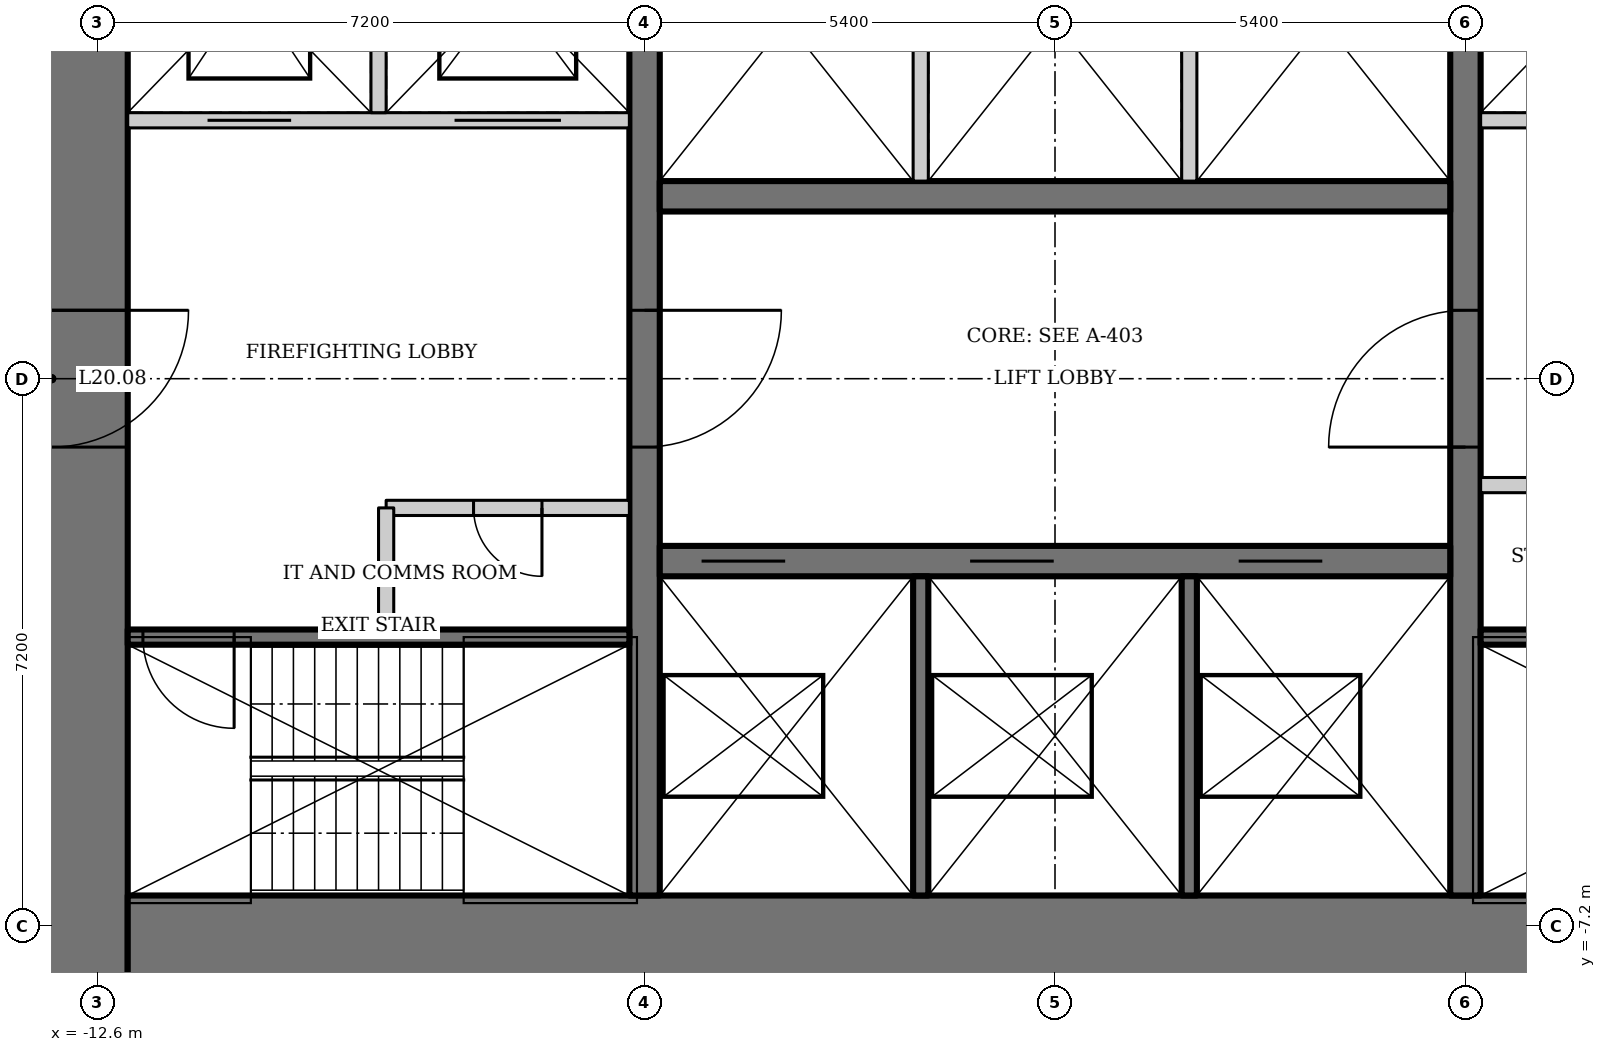
"""IFC4 building model, lengths in metres.
Left out: names, types, materials, properties, quantities, classifications, styles, units other than length and angle.
Written with IfcOpenShell. Run it as: python <this file> out.ifc"""

import sys

from ifc_helpers import new_model, si_unit, direction, frame, frame_2d, origin, place, context, subcontext, project, spatial, rectangle, extrude, element, fill, save


model = new_model("IFC4")
c1 = context("Model", 3, precision=1e-05, world=origin(), true_north=direction((0.0, 1.0)))
c2 = subcontext(c1, "Body", "Model", "MODEL_VIEW")
j1 = project(units=[si_unit("LENGTHUNIT", "METRE"), si_unit("PLANEANGLEUNIT", "RADIAN")], contexts=[c1])
p1 = place(None, origin())
s1 = spatial("IfcSite", under=j1, at=p1, CompositionType="ELEMENT")
p2 = place(p1, origin())
s2 = spatial("IfcBuilding", under=s1, at=p2, CompositionType="ELEMENT")
p3 = place(p2, frame((0.0, 0.0, 87.4)))
s3 = spatial("IfcBuildingStorey", under=s2, at=p3, CompositionType="ELEMENT", Elevation=87.4)
p4 = place(p3, frame((-13.2, 13.0, 0.0), z_axis=(0.0, 0.0, 1.0), x_axis=(0.0, -1.0, 0.0)))
e1 = element("IfcWall", 1, at=p4, inside=s3, PredefinedType="SHEAR", context=c2, shape_type="SweptSolid", body=[
    extrude(rectangle(XDim=26.0, YDim=2.0, at=frame_2d((13.0, 0.0))), origin(), (0.0, 0.0, 1.0), 3.6),
])
p5 = place(p4, frame((12.1, 0.0, 0.0)))
e2 = element("IfcOpeningElement", 2, at=p5, cuts=e1, PredefinedType="OPENING", context=c2, shape_type="SweptSolid", body=[
    extrude(rectangle(XDim=1.8, YDim=2.1, at=frame_2d((0.9, 1.05))), frame((0.0, 1.01, 0.0), z_axis=(0.0, -1.0, 0.0), x_axis=(1.0, 0.0, 0.0)), (0.0, 0.0, 1.0), 2.02),
])
p6 = place(p3, frame((-12.2, -8.0, 0.0), z_axis=(0.0, 0.0, 1.0), x_axis=(1.0, 0.0, 0.0)))
e3 = element("IfcWall", 3, at=p6, inside=s3, PredefinedType="SHEAR", context=c2, shape_type="SweptSolid", body=[
    extrude(rectangle(XDim=24.4, YDim=2.4, at=frame_2d((12.2, 0.0))), origin(), (0.0, 0.0, 1.0), 3.6),
])
p7 = place(p3, frame((5.4, -6.8, 0.0), z_axis=(0.0, 0.0, 1.0), x_axis=(0.0, 1.0, 0.0)))
e4 = element("IfcWall", 4, at=p7, inside=s3, PredefinedType="SHEAR", context=c2, shape_type="SweptSolid", body=[
    extrude(rectangle(XDim=13.6, YDim=0.4, at=frame_2d((6.8, 0.0))), origin(), (0.0, 0.0, 1.0), 3.6),
])
p8 = place(p7, frame((5.9, 0.0, 0.0)))
e5 = element("IfcOpeningElement", 5, at=p8, cuts=e4, PredefinedType="OPENING", context=c2, shape_type="SweptSolid", body=[
    extrude(rectangle(XDim=1.8, YDim=2.1, at=frame_2d((0.9, 1.05))), frame((0.0, 0.21, 0.0), z_axis=(0.0, -1.0, 0.0), x_axis=(1.0, 0.0, 0.0)), (0.0, 0.0, 1.0), 0.42),
])
p9 = place(p3, frame((-5.4, 6.8, 0.0), z_axis=(0.0, 0.0, 1.0), x_axis=(0.0, -1.0, 0.0)))
e6 = element("IfcWall", 6, at=p9, inside=s3, PredefinedType="SHEAR", context=c2, shape_type="SweptSolid", body=[
    extrude(rectangle(XDim=13.6, YDim=0.4, at=frame_2d((6.8, 0.0))), origin(), (0.0, 0.0, 1.0), 3.6),
])
p10 = place(p9, frame((5.9, 0.0, 0.0)))
e7 = element("IfcOpeningElement", 7, at=p10, cuts=e6, PredefinedType="OPENING", context=c2, shape_type="SweptSolid", body=[
    extrude(rectangle(XDim=1.8, YDim=2.1, at=frame_2d((0.9, 1.05))), frame((0.0, 0.21, 0.0), z_axis=(0.0, -1.0, 0.0), x_axis=(1.0, 0.0, 0.0)), (0.0, 0.0, 1.0), 0.42),
])
p11 = place(p3, frame((-5.2, -2.4, 0.0), z_axis=(0.0, 0.0, 1.0), x_axis=(1.0, 0.0, 0.0)))
e8 = element("IfcWall", 8, at=p11, inside=s3, PredefinedType="SHEAR", context=c2, shape_type="SweptSolid", body=[
    extrude(rectangle(XDim=10.4, YDim=0.4, at=frame_2d((5.2, 0.0))), origin(), (0.0, 0.0, 1.0), 3.6),
])
p12 = place(p11, frame((0.55, 0.0, 0.0)))
e9 = element("IfcOpeningElement", 9, at=p12, cuts=e8, PredefinedType="OPENING", context=c2, shape_type="SweptSolid", body=[
    extrude(rectangle(XDim=1.1, YDim=2.2, at=frame_2d((0.55, 1.1))), frame((0.0, 0.21, 0.0), z_axis=(0.0, -1.0, 0.0), x_axis=(1.0, 0.0, 0.0)), (0.0, 0.0, 1.0), 0.42),
])
p13 = place(p11, frame((4.083, 0.0, 0.0)))
e10 = element("IfcOpeningElement", 10, at=p13, cuts=e8, PredefinedType="OPENING", context=c2, shape_type="SweptSolid", body=[
    extrude(rectangle(XDim=1.1, YDim=2.2, at=frame_2d((0.55, 1.1))), frame((0.0, 0.21, 0.0), z_axis=(0.0, -1.0, 0.0), x_axis=(1.0, 0.0, 0.0)), (0.0, 0.0, 1.0), 0.42),
])
p14 = place(p11, frame((7.617, 0.0, 0.0)))
e11 = element("IfcOpeningElement", 11, at=p14, cuts=e8, PredefinedType="OPENING", context=c2, shape_type="SweptSolid", body=[
    extrude(rectangle(XDim=1.1, YDim=2.2, at=frame_2d((0.55, 1.1))), frame((0.0, 0.21, 0.0), z_axis=(0.0, -1.0, 0.0), x_axis=(1.0, 0.0, 0.0)), (0.0, 0.0, 1.0), 0.42),
])
for number, where, z_axis, x_axis in (
    (12, (-1.767, -2.6, 0.0), (0.0, 0.0, 1.0), (0.0, -1.0, 0.0)),
    (13, (1.767, -2.6, 0.0), (0.0, 0.0, 1.0), (0.0, -1.0, 0.0)),
):
    element("IfcWall", number, at=place(p3, frame(where, z_axis=z_axis, x_axis=x_axis)), inside=s3, PredefinedType="SOLIDWALL", context=c2, shape_type="SweptSolid", body=[
        extrude(rectangle(XDim=4.2, YDim=0.2, at=frame_2d((2.1, 0.0))), origin(), (0.0, 0.0, 1.0), 3.6),
    ])
p15 = place(p3, frame((5.2, 2.4, 0.0), z_axis=(0.0, 0.0, 1.0), x_axis=(-1.0, 0.0, 0.0)))
e14 = element("IfcWall", 14, at=p15, inside=s3, PredefinedType="SHEAR", context=c2, shape_type="SweptSolid", body=[
    extrude(rectangle(XDim=10.4, YDim=0.4, at=frame_2d((5.2, 0.0))), origin(), (0.0, 0.0, 1.0), 3.6),
])
for number, where, z_axis, x_axis in (
    (15, (-1.767, 2.6, 0.0), (0.0, 0.0, 1.0), (0.0, 1.0, 0.0)),
    (16, (1.767, 2.6, 0.0), (0.0, 0.0, 1.0), (0.0, 1.0, 0.0)),
):
    element("IfcWall", number, at=place(p3, frame(where, z_axis=z_axis, x_axis=x_axis)), inside=s3, PredefinedType="SOLIDWALL", context=c2, shape_type="SweptSolid", body=[
        extrude(rectangle(XDim=4.2, YDim=0.2, at=frame_2d((2.1, 0.0))), origin(), (0.0, 0.0, 1.0), 3.6),
    ])
p16 = place(p3, frame((5.6, -3.4, 0.0), z_axis=(0.0, 0.0, 1.0), x_axis=(1.0, 0.0, 0.0)))
e17 = element("IfcWall", 17, at=p16, inside=s3, PredefinedType="SHEAR", context=c2, shape_type="SweptSolid", body=[
    extrude(rectangle(XDim=6.6, YDim=0.2, at=frame_2d((3.3, 0.0))), origin(), (0.0, 0.0, 1.0), 3.6),
])
p17 = place(p16, frame((5.2, 0.0, 0.0)))
e18 = element("IfcOpeningElement", 18, at=p17, cuts=e17, PredefinedType="OPENING", context=c2, shape_type="SweptSolid", body=[
    extrude(rectangle(XDim=1.2, YDim=2.1, at=frame_2d((0.6, 1.05))), frame((0.0, 0.11, 0.0), z_axis=(0.0, -1.0, 0.0), x_axis=(1.0, 0.0, 0.0)), (0.0, 0.0, 1.0), 0.22),
])
p18 = place(p3, frame((12.2, 3.4, 0.0), z_axis=(0.0, 0.0, 1.0), x_axis=(-1.0, 0.0, 0.0)))
e19 = element("IfcWall", 19, at=p18, inside=s3, PredefinedType="SOLIDWALL", context=c2, shape_type="SweptSolid", body=[
    extrude(rectangle(XDim=6.6, YDim=0.2, at=frame_2d((3.3, 0.0))), origin(), (0.0, 0.0, 1.0), 3.6),
])
p19 = place(p18, frame((4.45, 0.0, 0.0)))
e20 = element("IfcOpeningElement", 20, at=p19, cuts=e19, PredefinedType="OPENING", context=c2, shape_type="SweptSolid", body=[
    extrude(rectangle(XDim=1.1, YDim=2.2, at=frame_2d((0.55, 1.1))), frame((0.0, 0.11, 0.0), z_axis=(0.0, -1.0, 0.0), x_axis=(1.0, 0.0, 0.0)), (0.0, 0.0, 1.0), 0.22),
])
p20 = place(p18, frame((0.9, 0.0, 0.0)))
e21 = element("IfcOpeningElement", 21, at=p20, cuts=e19, PredefinedType="OPENING", context=c2, shape_type="SweptSolid", body=[
    extrude(rectangle(XDim=1.4, YDim=2.2, at=frame_2d((0.7, 1.1))), frame((0.0, 0.11, 0.0), z_axis=(0.0, -1.0, 0.0), x_axis=(1.0, 0.0, 0.0)), (0.0, 0.0, 1.0), 0.22),
])
p21 = place(p3, frame((-5.6, -3.4, 0.0), z_axis=(0.0, 0.0, 1.0), x_axis=(-1.0, 0.0, 0.0)))
e22 = element("IfcWall", 22, at=p21, inside=s3, PredefinedType="SHEAR", context=c2, shape_type="SweptSolid", body=[
    extrude(rectangle(XDim=6.6, YDim=0.2, at=frame_2d((3.3, 0.0))), origin(), (0.0, 0.0, 1.0), 3.6),
])
p22 = place(p21, frame((5.2, 0.0, 0.0)))
e23 = element("IfcOpeningElement", 23, at=p22, cuts=e22, PredefinedType="OPENING", context=c2, shape_type="SweptSolid", body=[
    extrude(rectangle(XDim=1.2, YDim=2.1, at=frame_2d((0.6, 1.05))), frame((0.0, 0.11, 0.0), z_axis=(0.0, -1.0, 0.0), x_axis=(1.0, 0.0, 0.0)), (0.0, 0.0, 1.0), 0.22),
])
p23 = place(p3, frame((-12.2, 3.4, 0.0), z_axis=(0.0, 0.0, 1.0), x_axis=(1.0, 0.0, 0.0)))
e24 = element("IfcWall", 24, at=p23, inside=s3, PredefinedType="SOLIDWALL", context=c2, shape_type="SweptSolid", body=[
    extrude(rectangle(XDim=6.6, YDim=0.2, at=frame_2d((3.3, 0.0))), origin(), (0.0, 0.0, 1.0), 3.6),
])
p24 = place(p23, frame((1.05, 0.0, 0.0)))
e25 = element("IfcOpeningElement", 25, at=p24, cuts=e24, PredefinedType="OPENING", context=c2, shape_type="SweptSolid", body=[
    extrude(rectangle(XDim=1.1, YDim=2.2, at=frame_2d((0.55, 1.1))), frame((0.0, 0.11, 0.0), z_axis=(0.0, -1.0, 0.0), x_axis=(1.0, 0.0, 0.0)), (0.0, 0.0, 1.0), 0.22),
])
p25 = place(p23, frame((4.3, 0.0, 0.0)))
e26 = element("IfcOpeningElement", 26, at=p25, cuts=e24, PredefinedType="OPENING", context=c2, shape_type="SweptSolid", body=[
    extrude(rectangle(XDim=1.4, YDim=2.2, at=frame_2d((0.7, 1.1))), frame((0.0, 0.11, 0.0), z_axis=(0.0, -1.0, 0.0), x_axis=(1.0, 0.0, 0.0)), (0.0, 0.0, 1.0), 0.22),
])
p26 = place(p3, frame((-8.9, 3.5, 0.0), z_axis=(0.0, 0.0, 1.0), x_axis=(0.0, 1.0, 0.0)))
e27 = element("IfcWall", 27, at=p26, inside=s3, PredefinedType="SOLIDWALL", context=c2, shape_type="SweptSolid", body=[
    extrude(rectangle(XDim=3.3, YDim=0.2, at=frame_2d((1.65, 0.0))), origin(), (0.0, 0.0, 1.0), 3.6),
])
p27 = place(p3, frame((-5.6, -1.7, 0.0), z_axis=(0.0, 0.0, 1.0), x_axis=(-1.0, 0.0, 0.0)))
e28 = element("IfcWall", 28, at=p27, inside=s3, PredefinedType="SOLIDWALL", context=c2, shape_type="SweptSolid", body=[
    extrude(rectangle(XDim=3.2, YDim=0.2, at=frame_2d((1.6, 0.0))), origin(), (0.0, 0.0, 1.0), 3.45),
])
p28 = place(p27, frame((1.15, 0.0, 0.0)))
e29 = element("IfcOpeningElement", 29, at=p28, cuts=e28, PredefinedType="OPENING", context=c2, shape_type="SweptSolid", body=[
    extrude(rectangle(XDim=0.9, YDim=2.1, at=frame_2d((0.45, 1.05))), frame((0.0, 0.11, 0.0), z_axis=(0.0, -1.0, 0.0), x_axis=(1.0, 0.0, 0.0)), (0.0, 0.0, 1.0), 0.22),
])
p29 = place(p3, frame((-8.8, -1.7, 0.0), z_axis=(0.0, 0.0, 1.0), x_axis=(0.0, -1.0, 0.0)))
e30 = element("IfcWall", 30, at=p29, inside=s3, PredefinedType="SOLIDWALL", context=c2, shape_type="SweptSolid", body=[
    extrude(rectangle(XDim=1.6, YDim=0.2, at=frame_2d((0.8, 0.0))), origin(), (0.0, 0.0, 1.0), 3.45),
])
p30 = place(p3, frame((5.6, -1.4, 0.0), z_axis=(0.0, 0.0, 1.0), x_axis=(1.0, 0.0, 0.0)))
e31 = element("IfcWall", 31, at=p30, inside=s3, PredefinedType="SOLIDWALL", context=c2, shape_type="SweptSolid", body=[
    extrude(rectangle(XDim=2.2, YDim=0.2, at=frame_2d((1.1, 0.0))), origin(), (0.0, 0.0, 1.0), 3.45),
])
p31 = place(p30, frame((0.65, 0.0, 0.0)))
e32 = element("IfcOpeningElement", 32, at=p31, cuts=e31, PredefinedType="OPENING", context=c2, shape_type="SweptSolid", body=[
    extrude(rectangle(XDim=0.9, YDim=2.1, at=frame_2d((0.45, 1.05))), frame((0.0, 0.11, 0.0), z_axis=(0.0, -1.0, 0.0), x_axis=(1.0, 0.0, 0.0)), (0.0, 0.0, 1.0), 0.22),
])
p32 = place(p28, origin())
e33 = element("IfcDoor", 33, at=p32, inside=s3, OperationType="SINGLE_SWING_LEFT", PredefinedType="DOOR", context=c2, shape_type="SweptSolid", body=[
    extrude(rectangle(XDim=0.9, YDim=2.1, at=frame_2d((0.45, 1.05))), frame((0.0, 0.025, 0.0), z_axis=(0.0, -1.0, 0.0), x_axis=(1.0, 0.0, 0.0)), (0.0, 0.0, 1.0), 0.05),
])
fill(e29, e33)
p33 = place(p8, origin())
e34 = element("IfcDoor", 34, at=p33, inside=s3, OperationType="DOUBLE_DOOR_DOUBLE_SWING", PredefinedType="DOOR", context=c2, shape_type="SweptSolid", body=[
    extrude(rectangle(XDim=1.8, YDim=2.1, at=frame_2d((0.9, 1.05))), frame((0.0, 0.025, 0.0), z_axis=(0.0, -1.0, 0.0), x_axis=(1.0, 0.0, 0.0)), (0.0, 0.0, 1.0), 0.05),
])
fill(e5, e34)
p34 = place(p10, origin())
e35 = element("IfcDoor", 35, at=p34, inside=s3, OperationType="DOUBLE_DOOR_DOUBLE_SWING", PredefinedType="DOOR", context=c2, shape_type="SweptSolid", body=[
    extrude(rectangle(XDim=1.8, YDim=2.1, at=frame_2d((0.9, 1.05))), frame((0.0, 0.025, 0.0), z_axis=(0.0, -1.0, 0.0), x_axis=(1.0, 0.0, 0.0)), (0.0, 0.0, 1.0), 0.05),
])
fill(e7, e35)
p35 = place(p22, origin())
e36 = element("IfcDoor", 36, at=p35, inside=s3, OperationType="SINGLE_SWING_RIGHT", PredefinedType="DOOR", context=c2, shape_type="SweptSolid", body=[
    extrude(rectangle(XDim=1.2, YDim=2.1, at=frame_2d((0.6, 1.05))), frame((0.0, 0.025, 0.0), z_axis=(0.0, -1.0, 0.0), x_axis=(1.0, 0.0, 0.0)), (0.0, 0.0, 1.0), 0.05),
])
fill(e23, e36)
p36 = place(p5, origin())
e37 = element("IfcDoor", 37, at=p36, inside=s3, OperationType="DOUBLE_DOOR_DOUBLE_SWING", PredefinedType="DOOR", context=c2, shape_type="SweptSolid", body=[
    extrude(rectangle(XDim=1.8, YDim=2.1, at=frame_2d((0.9, 1.05))), frame((0.0, 0.025, 0.0), z_axis=(0.0, -1.0, 0.0), x_axis=(1.0, 0.0, 0.0)), (0.0, 0.0, 1.0), 0.05),
])
fill(e2, e37)
p37 = place(p12, origin())
e38 = element("IfcDoor", 38, at=p37, inside=s3, OperationType="DOUBLE_DOOR_SLIDING", PredefinedType="DOOR", context=c2, shape_type="SweptSolid", body=[
    extrude(rectangle(XDim=1.1, YDim=2.2, at=frame_2d((0.55, 1.1))), frame((0.0, 0.025, 0.0), z_axis=(0.0, -1.0, 0.0), x_axis=(1.0, 0.0, 0.0)), (0.0, 0.0, 1.0), 0.05),
])
fill(e9, e38)
p38 = place(p13, origin())
e39 = element("IfcDoor", 39, at=p38, inside=s3, OperationType="DOUBLE_DOOR_SLIDING", PredefinedType="DOOR", context=c2, shape_type="SweptSolid", body=[
    extrude(rectangle(XDim=1.1, YDim=2.2, at=frame_2d((0.55, 1.1))), frame((0.0, 0.025, 0.0), z_axis=(0.0, -1.0, 0.0), x_axis=(1.0, 0.0, 0.0)), (0.0, 0.0, 1.0), 0.05),
])
fill(e10, e39)
p39 = place(p14, origin())
e40 = element("IfcDoor", 40, at=p39, inside=s3, OperationType="DOUBLE_DOOR_SLIDING", PredefinedType="DOOR", context=c2, shape_type="SweptSolid", body=[
    extrude(rectangle(XDim=1.1, YDim=2.2, at=frame_2d((0.55, 1.1))), frame((0.0, 0.025, 0.0), z_axis=(0.0, -1.0, 0.0), x_axis=(1.0, 0.0, 0.0)), (0.0, 0.0, 1.0), 0.05),
])
fill(e11, e40)
p40 = place(p24, origin())
e41 = element("IfcDoor", 41, at=p40, inside=s3, OperationType="DOUBLE_DOOR_SLIDING", PredefinedType="DOOR", context=c2, shape_type="SweptSolid", body=[
    extrude(rectangle(XDim=1.1, YDim=2.2, at=frame_2d((0.55, 1.1))), frame((0.0, 0.025, 0.0), z_axis=(0.0, -1.0, 0.0), x_axis=(1.0, 0.0, 0.0)), (0.0, 0.0, 1.0), 0.05),
])
fill(e25, e41)
p41 = place(p25, origin())
e42 = element("IfcDoor", 42, at=p41, inside=s3, OperationType="DOUBLE_DOOR_SLIDING", PredefinedType="DOOR", context=c2, shape_type="SweptSolid", body=[
    extrude(rectangle(XDim=1.4, YDim=2.2, at=frame_2d((0.7, 1.1))), frame((0.0, 0.025, 0.0), z_axis=(0.0, -1.0, 0.0), x_axis=(1.0, 0.0, 0.0)), (0.0, 0.0, 1.0), 0.05),
])
fill(e26, e42)
save(model, sys.argv[1])
